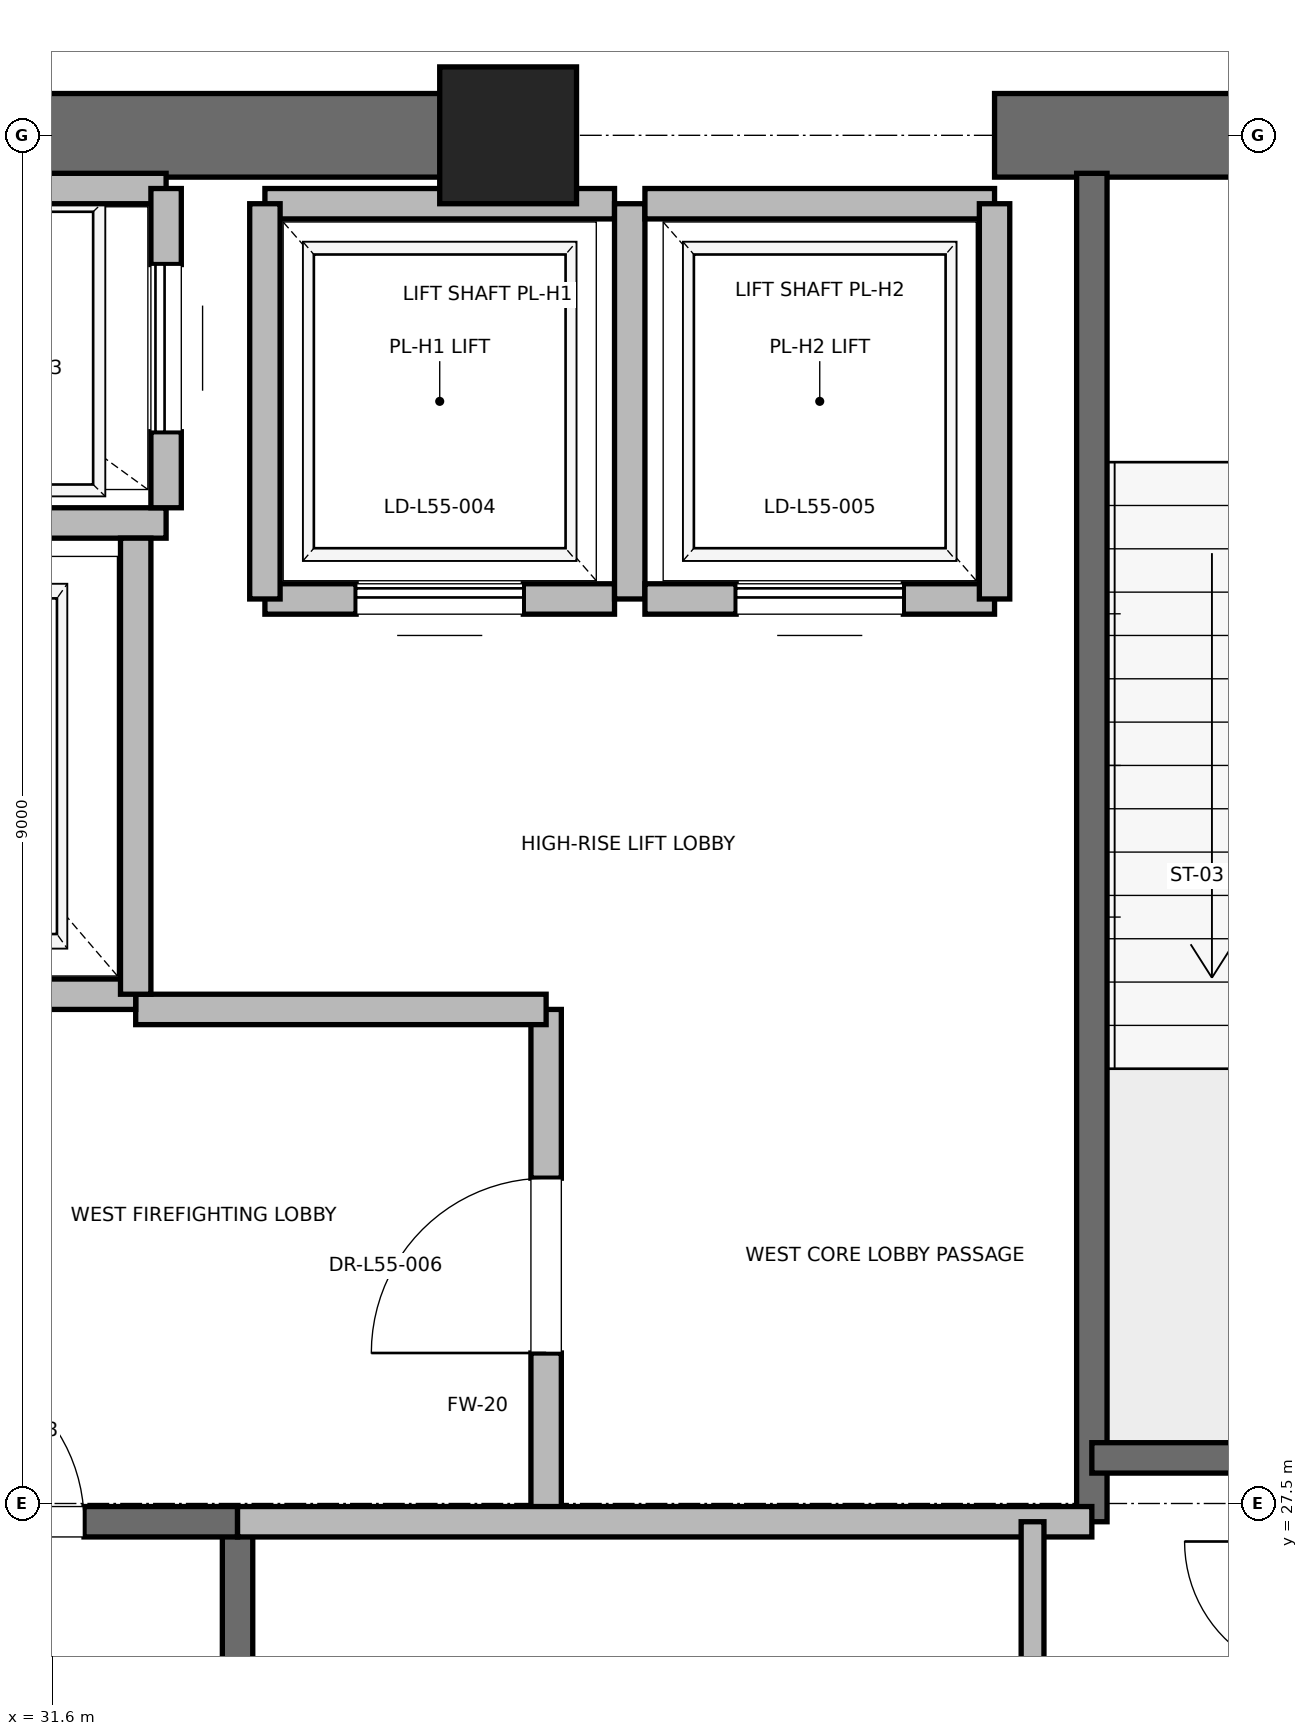
"""IFC4 building model, lengths in metres.
Left out: names, types, materials, properties, quantities, classifications, styles, units other than length and angle.
Written with IfcOpenShell. Run it as: python <this file> out.ifc"""

import sys

from ifc_helpers import new_model, si_unit, direction, frame, frame_2d, origin, origin_2d, place, context, subcontext, project, spatial, rectangle, extrude, element, fill, save


model = new_model("IFC4")
c1 = context("Model", 3, precision=1e-05, world=origin(), true_north=direction((0.0, 1.0)))
c2 = subcontext(c1, "Body", "Model", "MODEL_VIEW")
j1 = project(units=[si_unit("LENGTHUNIT", "METRE"), si_unit("PLANEANGLEUNIT", "RADIAN")], contexts=[c1])
p1 = place(None, origin())
s1 = spatial("IfcSite", under=j1, at=p1, CompositionType="ELEMENT")
p2 = place(p1, origin())
s2 = spatial("IfcBuilding", under=s1, at=p2, CompositionType="ELEMENT")
p3 = place(p2, frame((0.0, 0.0, 238.2)))
s3 = spatial("IfcBuildingStorey", under=s2, at=p3, CompositionType="ELEMENT", Elevation=238.2)
p4 = place(p3, frame((34.6, 36.5, 0.0), z_axis=(0.0, 0.0, 1.0), x_axis=(1.0, 0.0, 0.0)))
e1 = element("IfcColumn", 1, at=p4, inside=s3, PredefinedType="PILASTER", context=c2, shape_type="SweptSolid", body=[
    extrude(rectangle(XDim=0.9, YDim=0.9, at=origin_2d()), origin(), (0.0, 0.0, 1.0), 5.0),
])
p5 = place(p3, frame((29.0, 36.5, 0.0), z_axis=(0.0, 0.0, 1.0), x_axis=(1.0, 0.0, 0.0)))
e2 = element("IfcWall", 2, at=p5, inside=s3, PredefinedType="SHEAR", context=c2, shape_type="SweptSolid", body=[
    extrude(rectangle(XDim=5.8, YDim=0.55, at=frame_2d((2.9, 0.0))), origin(), (0.0, 0.0, 1.0), 4.785),
])
p6 = place(p3, frame((37.8, 36.5, 0.0), z_axis=(0.0, 0.0, 1.0), x_axis=(1.0, 0.0, 0.0)))
e3 = element("IfcWall", 3, at=p6, inside=s3, PredefinedType="SHEAR", context=c2, shape_type="SweptSolid", body=[
    extrude(rectangle(XDim=4.4, YDim=0.55, at=frame_2d((2.2, 0.0))), origin(), (0.0, 0.0, 1.0), 4.785),
])
p7 = place(p6, frame((1.65, 0.0, 0.0)))
e4 = element("IfcOpeningElement", 4, at=p7, cuts=e3, PredefinedType="OPENING", context=c2, shape_type="SweptSolid", body=[
    extrude(rectangle(XDim=1.1, YDim=2.15, at=frame_2d((0.55, 1.075))), frame((0.0, 0.275, 0.0), z_axis=(0.0, -1.0, 0.0), x_axis=(1.0, 0.0, 0.0)), (0.0, 0.0, 1.0), 0.55),
])
p8 = place(p3, frame((32.82, 18.6, 0.0), z_axis=(0.0, 0.0, 1.0), x_axis=(0.0, 1.0, 0.0)))
e5 = element("IfcWall", 5, at=p8, inside=s3, PredefinedType="SOLIDWALL", context=c2, shape_type="SweptSolid", body=[
    extrude(rectangle(XDim=8.78, YDim=0.2, at=frame_2d((4.39, 0.0))), origin(), (0.0, 0.0, 1.0), 4.785),
])
p9 = place(p3, frame((29.7, 27.38, 0.0), z_axis=(0.0, 0.0, 1.0), x_axis=(1.0, 0.0, 0.0)))
e6 = element("IfcWall", 6, at=p9, inside=s3, PredefinedType="SOLIDWALL", context=c2, shape_type="SweptSolid", body=[
    extrude(rectangle(XDim=3.12, YDim=0.2, at=frame_2d((1.56, 0.0))), origin(), (0.0, 0.0, 1.0), 4.785),
])
p10 = place(p9, frame((1.01, 0.0, 0.0)))
e7 = element("IfcOpeningElement", 7, at=p10, cuts=e6, PredefinedType="OPENING", context=c2, shape_type="SweptSolid", body=[
    extrude(rectangle(XDim=1.1, YDim=2.15, at=frame_2d((0.55, 1.075))), frame((0.0, 0.1, 0.0), z_axis=(0.0, -1.0, 0.0), x_axis=(1.0, 0.0, 0.0)), (0.0, 0.0, 1.0), 0.2),
])
p11 = place(p3, frame((38.44, 27.38, 0.0), z_axis=(0.0, 0.0, 1.0), x_axis=(0.0, 1.0, 0.0)))
e8 = element("IfcWall", 8, at=p11, inside=s3, PredefinedType="SOLIDWALL", context=c2, shape_type="SweptSolid", body=[
    extrude(rectangle(XDim=8.87, YDim=0.2, at=frame_2d((4.435, 0.0))), origin(), (0.0, 0.0, 1.0), 4.785),
])
p12 = place(p3, frame((38.44, 27.8, 0.0), z_axis=(0.0, 0.0, 1.0), x_axis=(1.0, 0.0, 0.0)))
e9 = element("IfcWall", 9, at=p12, inside=s3, PredefinedType="SOLIDWALL", context=c2, shape_type="SweptSolid", body=[
    extrude(rectangle(XDim=3.32, YDim=0.2, at=frame_2d((1.66, 0.0))), origin(), (0.0, 0.0, 1.0), 4.785),
])
p13 = place(p3, frame((34.85, 27.38, 0.0), z_axis=(0.0, 0.0, 1.0), x_axis=(0.0, 1.0, 0.0)))
e10 = element("IfcWall", 10, at=p13, inside=s3, PredefinedType="PARTITIONING", context=c2, shape_type="SweptSolid", body=[
    extrude(rectangle(XDim=3.37, YDim=0.2, at=frame_2d((1.685, 0.0))), origin(), (0.0, 0.0, 1.0), 4.785),
])
p14 = place(p13, frame((1.11, 0.0, 0.0)))
e11 = element("IfcOpeningElement", 11, at=p14, cuts=e10, PredefinedType="OPENING", context=c2, shape_type="SweptSolid", body=[
    extrude(rectangle(XDim=1.15, YDim=2.2, at=frame_2d((0.575, 1.1))), frame((0.0, 0.1, 0.0), z_axis=(0.0, -1.0, 0.0), x_axis=(1.0, 0.0, 0.0)), (0.0, 0.0, 1.0), 0.2),
])
p15 = place(p3, frame((32.82, 27.38, 0.0), z_axis=(0.0, 0.0, 1.0), x_axis=(1.0, 0.0, 0.0)))
e12 = element("IfcWall", 12, at=p15, inside=s3, PredefinedType="PARTITIONING", context=c2, shape_type="SweptSolid", body=[
    extrude(rectangle(XDim=5.62, YDim=0.2, at=frame_2d((2.81, 0.0))), origin(), (0.0, 0.0, 1.0), 4.785),
])
p16 = place(p3, frame((32.15, 30.75, 0.0), z_axis=(0.0, 0.0, 1.0), x_axis=(1.0, 0.0, 0.0)))
e13 = element("IfcWall", 13, at=p16, inside=s3, PredefinedType="PARTITIONING", context=c2, shape_type="SweptSolid", body=[
    extrude(rectangle(XDim=2.7, YDim=0.2, at=frame_2d((1.35, 0.0))), origin(), (0.0, 0.0, 1.0), 4.785),
])
p17 = place(p3, frame((29.55, 30.85, 0.0), z_axis=(0.0, 0.0, 1.0), x_axis=(1.0, 0.0, 0.0)))
e14 = element("IfcWall", 14, at=p17, inside=s3, PredefinedType="SOLIDWALL", context=c2, shape_type="SweptSolid", body=[
    extrude(rectangle(XDim=2.6, YDim=0.2, at=frame_2d((1.3, 0.0))), origin(), (0.0, 0.0, 1.0), 3.765),
])
p18 = place(p17, frame((0.75, 0.0, 0.0)))
e15 = element("IfcOpeningElement", 15, at=p18, cuts=e14, PredefinedType="OPENING", context=c2, shape_type="SweptSolid", body=[
    extrude(rectangle(XDim=1.1, YDim=2.2, at=frame_2d((0.55, 1.1))), frame((0.0, 0.1, 0.0), z_axis=(0.0, -1.0, 0.0), x_axis=(1.0, 0.0, 0.0)), (0.0, 0.0, 1.0), 0.2),
])
p19 = place(p3, frame((29.55, 33.95, 0.0), z_axis=(0.0, 0.0, 1.0), x_axis=(1.0, 0.0, 0.0)))
e16 = element("IfcWall", 16, at=p19, inside=s3, PredefinedType="SOLIDWALL", context=c2, shape_type="SweptSolid", body=[
    extrude(rectangle(XDim=2.8, YDim=0.2, at=frame_2d((1.4, 0.0))), origin(), (0.0, 0.0, 1.0), 4.785),
])
p20 = place(p3, frame((32.15, 30.85, 0.0), z_axis=(0.0, 0.0, 1.0), x_axis=(0.0, 1.0, 0.0)))
e17 = element("IfcWall", 17, at=p20, inside=s3, PredefinedType="SOLIDWALL", context=c2, shape_type="SweptSolid", body=[
    extrude(rectangle(XDim=3.0, YDim=0.2, at=frame_2d((1.5, 0.0))), origin(), (0.0, 0.0, 1.0), 4.785),
])
p21 = place(p3, frame((32.35, 36.15, 0.0), z_axis=(0.0, 0.0, 1.0), x_axis=(-1.0, 0.0, 0.0)))
e18 = element("IfcWall", 18, at=p21, inside=s3, PredefinedType="SOLIDWALL", context=c2, shape_type="SweptSolid", body=[
    extrude(rectangle(XDim=2.8, YDim=0.2, at=frame_2d((1.4, 0.0))), origin(), (0.0, 0.0, 1.0), 4.072),
])
p22 = place(p3, frame((32.35, 34.05, 0.0), z_axis=(0.0, 0.0, 1.0), x_axis=(0.0, 1.0, 0.0)))
e19 = element("IfcWall", 19, at=p22, inside=s3, PredefinedType="SOLIDWALL", context=c2, shape_type="SweptSolid", body=[
    extrude(rectangle(XDim=2.1, YDim=0.2, at=frame_2d((1.05, 0.0))), origin(), (0.0, 0.0, 1.0), 4.785),
])
p23 = place(p22, frame((0.5, 0.0, 0.0)))
e20 = element("IfcOpeningElement", 20, at=p23, cuts=e19, PredefinedType="OPENING", context=c2, shape_type="SweptSolid", body=[
    extrude(rectangle(XDim=1.1, YDim=2.2, at=frame_2d((0.55, 1.1))), frame((0.0, 0.1, 0.0), z_axis=(0.0, -1.0, 0.0), x_axis=(1.0, 0.0, 0.0)), (0.0, 0.0, 1.0), 0.2),
])
p24 = place(p3, frame((33.0, 33.45, 0.0), z_axis=(0.0, 0.0, 1.0), x_axis=(1.0, 0.0, 0.0)))
e21 = element("IfcWall", 21, at=p24, inside=s3, PredefinedType="SOLIDWALL", context=c2, shape_type="SweptSolid", body=[
    extrude(rectangle(XDim=2.3, YDim=0.2, at=frame_2d((1.15, 0.0))), origin(), (0.0, 0.0, 1.0), 4.785),
])
p25 = place(p24, frame((0.6, 0.0, 0.0)))
e22 = element("IfcOpeningElement", 22, at=p25, cuts=e21, PredefinedType="OPENING", context=c2, shape_type="SweptSolid", body=[
    extrude(rectangle(XDim=1.1, YDim=2.2, at=frame_2d((0.55, 1.1))), frame((0.0, 0.1, 0.0), z_axis=(0.0, -1.0, 0.0), x_axis=(1.0, 0.0, 0.0)), (0.0, 0.0, 1.0), 0.2),
])
p26 = place(p3, frame((35.3, 36.05, 0.0), z_axis=(0.0, 0.0, 1.0), x_axis=(-1.0, 0.0, 0.0)))
e23 = element("IfcWall", 23, at=p26, inside=s3, PredefinedType="SOLIDWALL", context=c2, shape_type="SweptSolid", body=[
    extrude(rectangle(XDim=2.3, YDim=0.2, at=frame_2d((1.15, 0.0))), origin(), (0.0, 0.0, 1.0), 3.765),
])
p27 = place(p3, frame((33.0, 36.05, 0.0), z_axis=(0.0, 0.0, 1.0), x_axis=(0.0, -1.0, 0.0)))
e24 = element("IfcWall", 24, at=p27, inside=s3, PredefinedType="SOLIDWALL", context=c2, shape_type="SweptSolid", body=[
    extrude(rectangle(XDim=2.6, YDim=0.2, at=frame_2d((1.3, 0.0))), origin(), (0.0, 0.0, 1.0), 4.785),
])
p28 = place(p3, frame((35.4, 33.45, 0.0), z_axis=(0.0, 0.0, 1.0), x_axis=(0.0, 1.0, 0.0)))
e25 = element("IfcWall", 25, at=p28, inside=s3, PredefinedType="SOLIDWALL", context=c2, shape_type="SweptSolid", body=[
    extrude(rectangle(XDim=2.6, YDim=0.2, at=frame_2d((1.3, 0.0))), origin(), (0.0, 0.0, 1.0), 3.765),
])
p29 = place(p3, frame((35.5, 33.45, 0.0), z_axis=(0.0, 0.0, 1.0), x_axis=(1.0, 0.0, 0.0)))
e26 = element("IfcWall", 26, at=p29, inside=s3, PredefinedType="SOLIDWALL", context=c2, shape_type="SweptSolid", body=[
    extrude(rectangle(XDim=2.3, YDim=0.2, at=frame_2d((1.15, 0.0))), origin(), (0.0, 0.0, 1.0), 4.785),
])
p30 = place(p29, frame((0.6, 0.0, 0.0)))
e27 = element("IfcOpeningElement", 27, at=p30, cuts=e26, PredefinedType="OPENING", context=c2, shape_type="SweptSolid", body=[
    extrude(rectangle(XDim=1.1, YDim=2.2, at=frame_2d((0.55, 1.1))), frame((0.0, 0.1, 0.0), z_axis=(0.0, -1.0, 0.0), x_axis=(1.0, 0.0, 0.0)), (0.0, 0.0, 1.0), 0.2),
])
p31 = place(p3, frame((37.8, 36.05, 0.0), z_axis=(0.0, 0.0, 1.0), x_axis=(-1.0, 0.0, 0.0)))
e28 = element("IfcWall", 28, at=p31, inside=s3, PredefinedType="SOLIDWALL", context=c2, shape_type="SweptSolid", body=[
    extrude(rectangle(XDim=2.3, YDim=0.2, at=frame_2d((1.15, 0.0))), origin(), (0.0, 0.0, 1.0), 3.765),
])
p32 = place(p3, frame((37.8, 33.45, 0.0), z_axis=(0.0, 0.0, 1.0), x_axis=(0.0, 1.0, 0.0)))
e29 = element("IfcWall", 29, at=p32, inside=s3, PredefinedType="SOLIDWALL", context=c2, shape_type="SweptSolid", body=[
    extrude(rectangle(XDim=2.6, YDim=0.2, at=frame_2d((1.3, 0.0))), origin(), (0.0, 0.0, 1.0), 3.765),
])
p33 = place(p3, frame((38.05, 18.6, 0.0), z_axis=(0.0, 0.0, 1.0), x_axis=(0.0, 1.0, 0.0)))
e30 = element("IfcWall", 30, at=p33, inside=s3, PredefinedType="PARTITIONING", context=c2, shape_type="SweptSolid", body=[
    extrude(rectangle(XDim=8.78, YDim=0.15, at=frame_2d((4.39, 0.0))), origin(), (0.0, 0.0, 1.0), 2.85),
])
p34 = place(p33, frame((3.89, 0.0, 0.0)))
e31 = element("IfcOpeningElement", 31, at=p34, cuts=e30, PredefinedType="OPENING", context=c2, shape_type="SweptSolid", body=[
    extrude(rectangle(XDim=1.0, YDim=2.15, at=frame_2d((0.5, 1.075))), frame((0.0, 0.075, 0.0), z_axis=(0.0, -1.0, 0.0), x_axis=(1.0, 0.0, 0.0)), (0.0, 0.0, 1.0), 0.15),
])
p35 = place(p10, origin())
e32 = element("IfcDoor", 32, at=p35, inside=s3, OperationType="SINGLE_SWING_LEFT", PredefinedType="DOOR", context=c2, shape_type="SweptSolid", body=[
    extrude(rectangle(XDim=1.1, YDim=2.15, at=frame_2d((0.55, 1.075))), frame((0.0, 0.025, 0.0), z_axis=(0.0, -1.0, 0.0), x_axis=(1.0, 0.0, 0.0)), (0.0, 0.0, 1.0), 0.05),
])
fill(e7, e32)
p36 = place(p14, origin())
e33 = element("IfcDoor", 33, at=p36, inside=s3, OperationType="SINGLE_SWING_LEFT", PredefinedType="DOOR", context=c2, shape_type="SweptSolid", body=[
    extrude(rectangle(XDim=1.15, YDim=2.2, at=frame_2d((0.575, 1.1))), frame((0.0, 0.025, 0.0), z_axis=(0.0, -1.0, 0.0), x_axis=(1.0, 0.0, 0.0)), (0.0, 0.0, 1.0), 0.05),
])
fill(e11, e33)
p37 = place(p23, origin())
e34 = element("IfcDoor", 34, at=p37, inside=s3, OperationType="SLIDING_TO_RIGHT", PredefinedType="DOOR", context=c2, shape_type="SweptSolid", body=[
    extrude(rectangle(XDim=1.1, YDim=2.2, at=frame_2d((0.55, 1.1))), frame((0.0, 0.025, 0.0), z_axis=(0.0, -1.0, 0.0), x_axis=(1.0, 0.0, 0.0)), (0.0, 0.0, 1.0), 0.05),
])
fill(e20, e34)
p38 = place(p25, origin())
e35 = element("IfcDoor", 35, at=p38, inside=s3, OperationType="SLIDING_TO_RIGHT", PredefinedType="DOOR", context=c2, shape_type="SweptSolid", body=[
    extrude(rectangle(XDim=1.1, YDim=2.2, at=frame_2d((0.55, 1.1))), frame((0.0, 0.025, 0.0), z_axis=(0.0, -1.0, 0.0), x_axis=(1.0, 0.0, 0.0)), (0.0, 0.0, 1.0), 0.05),
])
fill(e22, e35)
p39 = place(p30, origin())
e36 = element("IfcDoor", 36, at=p39, inside=s3, OperationType="SLIDING_TO_RIGHT", PredefinedType="DOOR", context=c2, shape_type="SweptSolid", body=[
    extrude(rectangle(XDim=1.1, YDim=2.2, at=frame_2d((0.55, 1.1))), frame((0.0, 0.025, 0.0), z_axis=(0.0, -1.0, 0.0), x_axis=(1.0, 0.0, 0.0)), (0.0, 0.0, 1.0), 0.05),
])
fill(e27, e36)
save(model, sys.argv[1])
